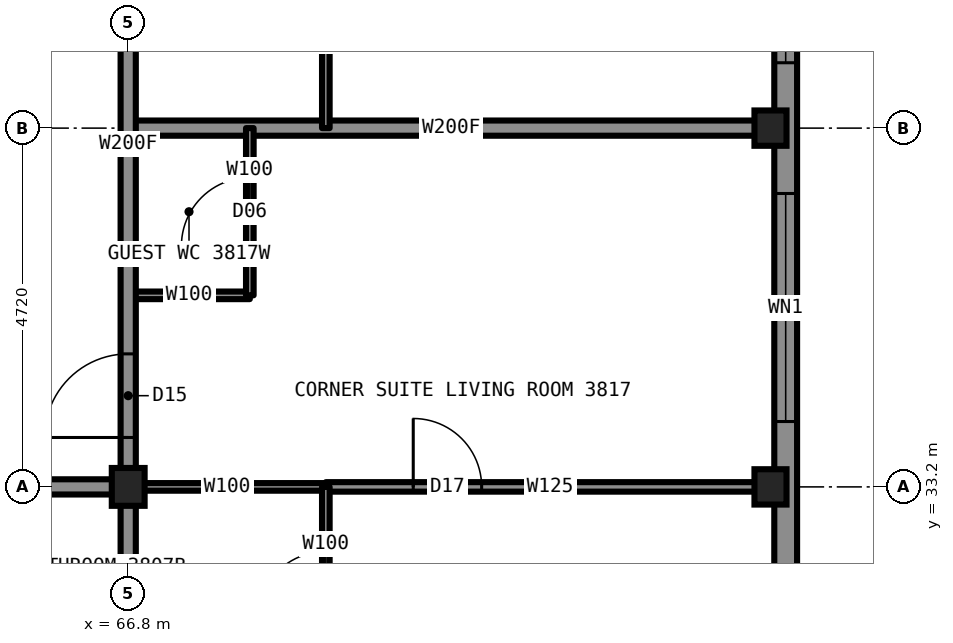
"""IFC4 building model, lengths in metres.
Left out: names, types, materials, properties, quantities, classifications, styles, units other than length and angle.
Written with IfcOpenShell. Run it as: python <this file> out.ifc"""

import sys

from ifc_helpers import new_model, si_unit, direction, frame, frame_2d, origin, origin_2d, place, context, subcontext, project, spatial, rectangle, i_section, extrude, element, fill, save


model = new_model("IFC4")
c1 = context("Model", 3, precision=1e-05, world=origin(), true_north=direction((0.0, 1.0)))
c2 = subcontext(c1, "Body", "Model", "MODEL_VIEW")
j1 = project(units=[si_unit("LENGTHUNIT", "METRE"), si_unit("PLANEANGLEUNIT", "RADIAN")], contexts=[c1])
p1 = place(None, origin())
s1 = spatial("IfcSite", under=j1, at=p1, CompositionType="ELEMENT")
p2 = place(p1, origin())
s2 = spatial("IfcBuilding", under=s1, at=p2, CompositionType="ELEMENT")
p3 = place(p2, frame((0.0, 0.0, 135.4)))
s3 = spatial("IfcBuildingStorey", under=s2, at=p3, CompositionType="ELEMENT", Elevation=135.4)
for number, where, z_axis, x_axis in (
    (1, (75.25, 33.2, 0.0), (0.0, 0.0, 1.0), (1.0, 0.0, 0.0)),
    (2, (75.25, 37.92, 0.0), (0.0, 0.0, 1.0), (1.0, 0.0, 0.0)),
):
    element("IfcColumn", number, at=place(p3, frame(where, z_axis=z_axis, x_axis=x_axis)), inside=s3, PredefinedType="COLUMN", context=c2, shape_type="SweptSolid", body=[
        extrude(i_section(OverallWidth=0.422, OverallDepth=0.465, WebThickness=0.045, FlangeThickness=0.073, at=origin_2d()), origin(), (0.0, 0.0, 1.0), 3.5),
    ])
p4 = place(p3, frame((66.8, 33.2, 0.0), z_axis=(0.0, 0.0, 1.0), x_axis=(1.0, 0.0, 0.0)))
e3 = element("IfcColumn", 3, at=p4, inside=s3, PredefinedType="COLUMN", context=c2, shape_type="SweptSolid", body=[
    extrude(i_section(OverallWidth=0.432, OverallDepth=0.498, WebThickness=0.056, FlangeThickness=0.089, at=origin_2d()), origin(), (0.0, 0.0, 1.0), 3.5),
])
p5 = place(p3, frame((66.8, 33.2, 0.0), z_axis=(0.0, 0.0, 1.0), x_axis=(1.0, 0.0, 0.0)))
e4 = element("IfcWall", 4, at=p5, inside=s3, PredefinedType="PARTITIONING", context=c2, shape_type="SweptSolid", body=[
    extrude(rectangle(XDim=2.6, YDim=0.1, at=frame_2d((1.3, 0.0))), origin(), (0.0, 0.0, 1.0), 2.573),
])
p6 = place(p3, frame((43.2, 33.2, 0.0), z_axis=(0.0, 0.0, 1.0), x_axis=(1.0, 0.0, 0.0)))
e5 = element("IfcWall", 5, at=p6, inside=s3, PredefinedType="PARTITIONING", context=c2, shape_type="SweptSolid", body=[
    extrude(rectangle(XDim=23.6, YDim=0.2, at=frame_2d((11.8, 0.0))), origin(), (0.0, 0.0, 1.0), 3.33),
])
p7 = place(p6, frame((3.0, 0.0, 0.0)))
e6 = element("IfcOpeningElement", 6, at=p7, cuts=e5, PredefinedType="OPENING", context=c2, shape_type="SweptSolid", body=[
    extrude(rectangle(XDim=1.0, YDim=2.2, at=frame_2d((0.5, 1.1))), frame((0.0, 0.11, 0.0), z_axis=(0.0, -1.0, 0.0), x_axis=(1.0, 0.0, 0.0)), (0.0, 0.0, 1.0), 0.22),
])
p8 = place(p6, frame((9.84, 0.0, 0.0)))
e7 = element("IfcOpeningElement", 7, at=p8, cuts=e5, PredefinedType="OPENING", context=c2, shape_type="SweptSolid", body=[
    extrude(rectangle(XDim=1.0, YDim=2.2, at=frame_2d((0.5, 1.1))), frame((0.0, 0.11, 0.0), z_axis=(0.0, -1.0, 0.0), x_axis=(1.0, 0.0, 0.0)), (0.0, 0.0, 1.0), 0.22),
])
p9 = place(p6, frame((16.71, 0.0, 0.0)))
e8 = element("IfcOpeningElement", 8, at=p9, cuts=e5, PredefinedType="OPENING", context=c2, shape_type="SweptSolid", body=[
    extrude(rectangle(XDim=1.0, YDim=2.2, at=frame_2d((0.5, 1.1))), frame((0.0, 0.11, 0.0), z_axis=(0.0, -1.0, 0.0), x_axis=(1.0, 0.0, 0.0)), (0.0, 0.0, 1.0), 0.22),
])
p10 = place(p6, frame((20.34, 0.0, 0.0)))
e9 = element("IfcOpeningElement", 9, at=p10, cuts=e5, PredefinedType="OPENING", context=c2, shape_type="SweptSolid", body=[
    extrude(rectangle(XDim=1.0, YDim=2.2, at=frame_2d((0.5, 1.1))), frame((0.0, 0.11, 0.0), z_axis=(0.0, -1.0, 0.0), x_axis=(1.0, 0.0, 0.0)), (0.0, 0.0, 1.0), 0.22),
])
p11 = place(p3, frame((69.4, 33.2, 0.0), z_axis=(0.0, 0.0, 1.0), x_axis=(1.0, 0.0, 0.0)))
e10 = element("IfcWall", 10, at=p11, inside=s3, PredefinedType="PARTITIONING", context=c2, shape_type="SweptSolid", body=[
    extrude(rectangle(XDim=5.9, YDim=0.125, at=frame_2d((2.95, 0.0))), origin(), (0.0, 0.0, 1.0), 2.573),
])
p12 = place(p11, frame((1.15, 0.0, 0.0)))
e11 = element("IfcOpeningElement", 11, at=p12, cuts=e10, PredefinedType="OPENING", context=c2, shape_type="SweptSolid", body=[
    extrude(rectangle(XDim=0.9, YDim=2.2, at=frame_2d((0.45, 1.1))), frame((0.0, 0.073, 0.0), z_axis=(0.0, -1.0, 0.0), x_axis=(1.0, 0.0, 0.0)), (0.0, 0.0, 1.0), 0.145),
])
p13 = place(p3, frame((66.8, 37.92, 0.0), z_axis=(0.0, 0.0, 1.0), x_axis=(1.0, 0.0, 0.0)))
e12 = element("IfcWall", 12, at=p13, inside=s3, PredefinedType="PARTITIONING", context=c2, shape_type="SweptSolid", body=[
    extrude(rectangle(XDim=8.5, YDim=0.2, at=frame_2d((4.25, 0.0))), origin(), (0.0, 0.0, 1.0), 2.573),
])
p14 = place(p3, frame((66.8, 35.72, 0.0), z_axis=(0.0, 0.0, 1.0), x_axis=(1.0, 0.0, 0.0)))
e13 = element("IfcWall", 13, at=p14, inside=s3, PredefinedType="PARTITIONING", context=c2, shape_type="SweptSolid", body=[
    extrude(rectangle(XDim=1.6, YDim=0.1, at=frame_2d((0.8, 0.0))), origin(), (0.0, 0.0, 1.0), 3.33),
])
p15 = place(p3, frame((66.8, 33.2, 0.0), z_axis=(0.0, 0.0, 1.0), x_axis=(0.0, 1.0, 0.0)))
e14 = element("IfcWall", 14, at=p15, inside=s3, PredefinedType="PARTITIONING", context=c2, shape_type="SweptSolid", body=[
    extrude(rectangle(XDim=23.6, YDim=0.2, at=frame_2d((11.8, 0.0))), origin(), (0.0, 0.0, 1.0), 3.33),
])
p16 = place(p15, frame((7.27, 0.0, 0.0)))
e15 = element("IfcOpeningElement", 15, at=p16, cuts=e14, PredefinedType="OPENING", context=c2, shape_type="SweptSolid", body=[
    extrude(rectangle(XDim=1.0, YDim=2.2, at=frame_2d((0.5, 1.1))), frame((0.0, 0.11, 0.0), z_axis=(0.0, -1.0, 0.0), x_axis=(1.0, 0.0, 0.0)), (0.0, 0.0, 1.0), 0.22),
])
p17 = place(p15, frame((11.99, 0.0, 0.0)))
e16 = element("IfcOpeningElement", 16, at=p17, cuts=e14, PredefinedType="OPENING", context=c2, shape_type="SweptSolid", body=[
    extrude(rectangle(XDim=1.0, YDim=2.2, at=frame_2d((0.5, 1.1))), frame((0.0, 0.11, 0.0), z_axis=(0.0, -1.0, 0.0), x_axis=(1.0, 0.0, 0.0)), (0.0, 0.0, 1.0), 0.22),
])
p18 = place(p15, frame((17.31, 0.0, 0.0)))
e17 = element("IfcOpeningElement", 17, at=p18, cuts=e14, PredefinedType="OPENING", context=c2, shape_type="SweptSolid", body=[
    extrude(rectangle(XDim=1.0, YDim=2.2, at=frame_2d((0.5, 1.1))), frame((0.0, 0.11, 0.0), z_axis=(0.0, -1.0, 0.0), x_axis=(1.0, 0.0, 0.0)), (0.0, 0.0, 1.0), 0.22),
])
p19 = place(p15, frame((21.85, 0.0, 0.0)))
e18 = element("IfcOpeningElement", 18, at=p19, cuts=e14, PredefinedType="OPENING", context=c2, shape_type="SweptSolid", body=[
    extrude(rectangle(XDim=1.1, YDim=2.2, at=frame_2d((0.55, 1.1))), frame((0.0, 0.11, 0.0), z_axis=(0.0, -1.0, 0.0), x_axis=(1.0, 0.0, 0.0)), (0.0, 0.0, 1.0), 0.22),
])
p20 = place(p15, frame((0.65, 0.0, 0.0)))
e19 = element("IfcOpeningElement", 19, at=p20, cuts=e14, PredefinedType="OPENING", context=c2, shape_type="SweptSolid", body=[
    extrude(rectangle(XDim=1.1, YDim=2.2, at=frame_2d((0.55, 1.1))), frame((0.0, 0.11, 0.0), z_axis=(0.0, -1.0, 0.0), x_axis=(1.0, 0.0, 0.0)), (0.0, 0.0, 1.0), 0.22),
])
p21 = place(p3, frame((66.8, 24.7, 0.0), z_axis=(0.0, 0.0, 1.0), x_axis=(0.0, 1.0, 0.0)))
e20 = element("IfcWall", 20, at=p21, inside=s3, PredefinedType="PARTITIONING", context=c2, shape_type="SweptSolid", body=[
    extrude(rectangle(XDim=8.5, YDim=0.2, at=frame_2d((4.25, 0.0))), origin(), (0.0, 0.0, 1.0), 2.573),
])
p22 = place(p3, frame((68.4, 35.72, 0.0), z_axis=(0.0, 0.0, 1.0), x_axis=(0.0, 1.0, 0.0)))
e21 = element("IfcWall", 21, at=p22, inside=s3, PredefinedType="PARTITIONING", context=c2, shape_type="SweptSolid", body=[
    extrude(rectangle(XDim=2.2, YDim=0.1, at=frame_2d((1.1, 0.0))), origin(), (0.0, 0.0, 1.0), 3.33),
])
p23 = place(p22, frame((0.65, 0.0, 0.0)))
e22 = element("IfcOpeningElement", 22, at=p23, cuts=e21, PredefinedType="OPENING", context=c2, shape_type="SweptSolid", body=[
    extrude(rectangle(XDim=0.9, YDim=2.1, at=frame_2d((0.45, 1.05))), frame((0.0, 0.06, 0.0), z_axis=(0.0, -1.0, 0.0), x_axis=(1.0, 0.0, 0.0)), (0.0, 0.0, 1.0), 0.12),
])
p24 = place(p3, frame((69.4, 30.6, 0.0), z_axis=(0.0, 0.0, 1.0), x_axis=(0.0, 1.0, 0.0)))
e23 = element("IfcWall", 23, at=p24, inside=s3, PredefinedType="PARTITIONING", context=c2, shape_type="SweptSolid", body=[
    extrude(rectangle(XDim=2.6, YDim=0.1, at=frame_2d((1.3, 0.0))), origin(), (0.0, 0.0, 1.0), 3.33),
])
p25 = place(p24, frame((0.85, 0.0, 0.0)))
e24 = element("IfcOpeningElement", 24, at=p25, cuts=e23, PredefinedType="OPENING", context=c2, shape_type="SweptSolid", body=[
    extrude(rectangle(XDim=0.9, YDim=2.1, at=frame_2d((0.45, 1.05))), frame((0.0, 0.06, 0.0), z_axis=(0.0, -1.0, 0.0), x_axis=(1.0, 0.0, 0.0)), (0.0, 0.0, 1.0), 0.12),
])
p26 = place(p3, frame((69.4, 37.92, 0.0), z_axis=(0.0, 0.0, 1.0), x_axis=(0.0, 1.0, 0.0)))
e25 = element("IfcWall", 25, at=p26, inside=s3, PredefinedType="PARTITIONING", context=c2, shape_type="SweptSolid", body=[
    extrude(rectangle(XDim=2.3, YDim=0.1, at=frame_2d((1.15, 0.0))), origin(), (0.0, 0.0, 1.0), 3.33),
])
p27 = place(p3, frame((75.45, 29.9, 0.0), z_axis=(0.0, 0.0, 1.0), x_axis=(0.0, 1.0, 0.0)))
e26 = element("IfcWall", 26, at=p27, inside=s3, PredefinedType="SOLIDWALL", context=c2, shape_type="SweptSolid", body=[
    extrude(rectangle(XDim=30.2, YDim=0.3, at=frame_2d((15.1, 0.0))), origin(), (0.0, 0.0, 1.0), 2.83),
])
p28 = place(p27, frame((0.85, 0.0, 0.5)))
e27 = element("IfcOpeningElement", 27, at=p28, cuts=e26, PredefinedType="OPENING", context=c2, shape_type="SweptSolid", body=[
    extrude(rectangle(XDim=1.6, YDim=2.0, at=frame_2d((0.8, 1.0))), frame((0.0, 0.16, 0.0), z_axis=(0.0, -1.0, 0.0), x_axis=(1.0, 0.0, 0.0)), (0.0, 0.0, 1.0), 0.32),
])
p29 = place(p27, frame((4.16, 0.0, 0.5)))
e28 = element("IfcOpeningElement", 28, at=p29, cuts=e26, PredefinedType="OPENING", context=c2, shape_type="SweptSolid", body=[
    extrude(rectangle(XDim=1.3, YDim=1.9, at=frame_2d((0.65, 0.95))), frame((0.0, 0.16, 0.0), z_axis=(0.0, -1.0, 0.0), x_axis=(1.0, 0.0, 0.0)), (0.0, 0.0, 1.0), 0.32),
])
p30 = place(p27, frame((8.88, 0.0, 0.5)))
e29 = element("IfcOpeningElement", 29, at=p30, cuts=e26, PredefinedType="OPENING", context=c2, shape_type="SweptSolid", body=[
    extrude(rectangle(XDim=3.0, YDim=2.0, at=frame_2d((1.5, 1.0))), frame((0.0, 0.16, 0.0), z_axis=(0.0, -1.0, 0.0), x_axis=(1.0, 0.0, 0.0)), (0.0, 0.0, 1.0), 0.32),
])
p31 = place(p27, frame((13.6, 0.0, 0.5)))
e30 = element("IfcOpeningElement", 30, at=p31, cuts=e26, PredefinedType="OPENING", context=c2, shape_type="SweptSolid", body=[
    extrude(rectangle(XDim=3.0, YDim=2.0, at=frame_2d((1.5, 1.0))), frame((0.0, 0.16, 0.0), z_axis=(0.0, -1.0, 0.0), x_axis=(1.0, 0.0, 0.0)), (0.0, 0.0, 1.0), 0.32),
])
p32 = place(p27, frame((18.32, 0.0, 0.5)))
e31 = element("IfcOpeningElement", 31, at=p32, cuts=e26, PredefinedType="OPENING", context=c2, shape_type="SweptSolid", body=[
    extrude(rectangle(XDim=3.0, YDim=2.0, at=frame_2d((1.5, 1.0))), frame((0.0, 0.16, 0.0), z_axis=(0.0, -1.0, 0.0), x_axis=(1.0, 0.0, 0.0)), (0.0, 0.0, 1.0), 0.32),
])
p33 = place(p27, frame((24.69, 0.0, 0.5)))
e32 = element("IfcOpeningElement", 32, at=p33, cuts=e26, PredefinedType="OPENING", context=c2, shape_type="SweptSolid", body=[
    extrude(rectangle(XDim=1.3, YDim=1.9, at=frame_2d((0.65, 0.95))), frame((0.0, 0.16, 0.0), z_axis=(0.0, -1.0, 0.0), x_axis=(1.0, 0.0, 0.0)), (0.0, 0.0, 1.0), 0.32),
])
p34 = place(p27, frame((27.75, 0.0, 0.5)))
e33 = element("IfcOpeningElement", 33, at=p34, cuts=e26, PredefinedType="OPENING", context=c2, shape_type="SweptSolid", body=[
    extrude(rectangle(XDim=1.6, YDim=2.0, at=frame_2d((0.8, 1.0))), frame((0.0, 0.16, 0.0), z_axis=(0.0, -1.0, 0.0), x_axis=(1.0, 0.0, 0.0)), (0.0, 0.0, 1.0), 0.32),
])
p35 = place(p27, frame((5.51, 0.0, 0.5)))
e34 = element("IfcOpeningElement", 34, at=p35, cuts=e26, PredefinedType="OPENING", context=c2, shape_type="SweptSolid", body=[
    extrude(rectangle(XDim=0.7, YDim=0.9, at=frame_2d((0.35, 0.45))), frame((0.0, 0.16, 0.0), z_axis=(0.0, -1.0, 0.0), x_axis=(1.0, 0.0, 0.0)), (0.0, 0.0, 1.0), 0.32),
])
p36 = place(p27, frame((23.99, 0.0, 0.5)))
e35 = element("IfcOpeningElement", 35, at=p36, cuts=e26, PredefinedType="OPENING", context=c2, shape_type="SweptSolid", body=[
    extrude(rectangle(XDim=0.7, YDim=0.9, at=frame_2d((0.35, 0.45))), frame((0.0, 0.16, 0.0), z_axis=(0.0, -1.0, 0.0), x_axis=(1.0, 0.0, 0.0)), (0.0, 0.0, 1.0), 0.32),
])
p37 = place(p20, origin())
e36 = element("IfcDoor", 36, at=p37, inside=s3, OperationType="SINGLE_SWING_LEFT", PredefinedType="DOOR", context=c2, shape_type="SweptSolid", body=[
    extrude(rectangle(XDim=1.1, YDim=2.2, at=frame_2d((0.55, 1.1))), frame((0.0, 0.025, 0.0), z_axis=(0.0, -1.0, 0.0), x_axis=(1.0, 0.0, 0.0)), (0.0, 0.0, 1.0), 0.05),
])
fill(e19, e36)
p38 = place(p25, origin())
e37 = element("IfcDoor", 37, at=p38, inside=s3, OperationType="SINGLE_SWING_RIGHT", PredefinedType="DOOR", context=c2, shape_type="SweptSolid", body=[
    extrude(rectangle(XDim=0.9, YDim=2.1, at=frame_2d((0.45, 1.05))), frame((0.0, 0.025, 0.0), z_axis=(0.0, -1.0, 0.0), x_axis=(1.0, 0.0, 0.0)), (0.0, 0.0, 1.0), 0.05),
])
fill(e24, e37)
p39 = place(p12, origin())
e38 = element("IfcDoor", 38, at=p39, inside=s3, OperationType="SINGLE_SWING_LEFT", PredefinedType="DOOR", context=c2, shape_type="SweptSolid", body=[
    extrude(rectangle(XDim=0.9, YDim=2.2, at=frame_2d((0.45, 1.1))), frame((0.0, 0.025, 0.0), z_axis=(0.0, -1.0, 0.0), x_axis=(1.0, 0.0, 0.0)), (0.0, 0.0, 1.0), 0.05),
])
fill(e11, e38)
p40 = place(p23, origin())
e39 = element("IfcDoor", 39, at=p40, inside=s3, OperationType="SINGLE_SWING_LEFT", PredefinedType="DOOR", context=c2, shape_type="SweptSolid", body=[
    extrude(rectangle(XDim=0.9, YDim=2.1, at=frame_2d((0.45, 1.05))), frame((0.0, 0.025, 0.0), z_axis=(0.0, -1.0, 0.0), x_axis=(1.0, 0.0, 0.0)), (0.0, 0.0, 1.0), 0.05),
])
fill(e22, e39)
p41 = place(p28, origin())
e40 = element("IfcWindow", 40, at=p41, inside=s3, PartitioningType="SINGLE_PANEL", PredefinedType="WINDOW", context=c2, shape_type="SweptSolid", body=[
    extrude(rectangle(XDim=1.6, YDim=2.0, at=frame_2d((0.8, 1.0))), frame((0.0, 0.03, 0.0), z_axis=(0.0, -1.0, 0.0), x_axis=(1.0, 0.0, 0.0)), (0.0, 0.0, 1.0), 0.06),
])
fill(e27, e40)
p42 = place(p29, origin())
e41 = element("IfcWindow", 41, at=p42, inside=s3, PartitioningType="SINGLE_PANEL", PredefinedType="WINDOW", context=c2, shape_type="SweptSolid", body=[
    extrude(rectangle(XDim=1.3, YDim=1.9, at=frame_2d((0.65, 0.95))), frame((0.0, 0.03, 0.0), z_axis=(0.0, -1.0, 0.0), x_axis=(1.0, 0.0, 0.0)), (0.0, 0.0, 1.0), 0.06),
])
fill(e28, e41)
p43 = place(p30, origin())
e42 = element("IfcWindow", 42, at=p43, inside=s3, PartitioningType="SINGLE_PANEL", PredefinedType="WINDOW", context=c2, shape_type="SweptSolid", body=[
    extrude(rectangle(XDim=3.0, YDim=2.0, at=frame_2d((1.5, 1.0))), frame((0.0, 0.03, 0.0), z_axis=(0.0, -1.0, 0.0), x_axis=(1.0, 0.0, 0.0)), (0.0, 0.0, 1.0), 0.06),
])
fill(e29, e42)
p44 = place(p35, origin())
e43 = element("IfcWindow", 43, at=p44, inside=s3, PartitioningType="SINGLE_PANEL", PredefinedType="WINDOW", context=c2, shape_type="SweptSolid", body=[
    extrude(rectangle(XDim=0.7, YDim=0.9, at=frame_2d((0.35, 0.45))), frame((0.0, 0.03, 0.0), z_axis=(0.0, -1.0, 0.0), x_axis=(1.0, 0.0, 0.0)), (0.0, 0.0, 1.0), 0.06),
])
fill(e34, e43)
save(model, sys.argv[1])
